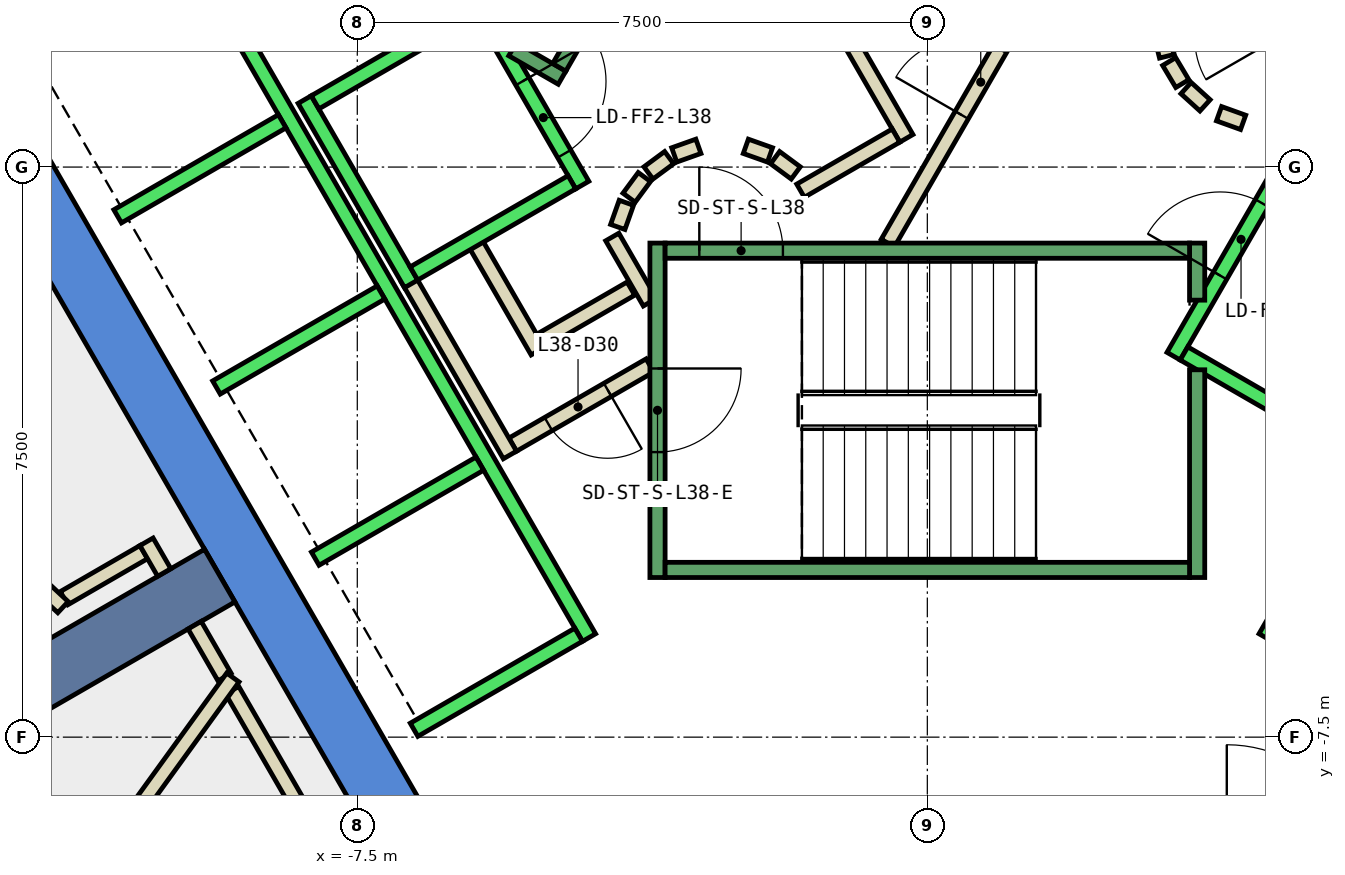
"""IFC4 building model, lengths in metres.
Left out: names, types, materials, properties, quantities, classifications, styles, units other than length and angle.
Written with IfcOpenShell. Run it as: python <this file> out.ifc"""

import sys

from ifc_helpers import new_model, si_unit, direction, frame, frame_2d, origin, place, context, subcontext, project, spatial, polyline, rectangle, outline, extrude, element, fill, save


model = new_model("IFC4")
c1 = context("Model", 3, precision=1e-05, world=origin(), true_north=direction((0.0, 1.0)))
c2 = subcontext(c1, "Body", "Model", "MODEL_VIEW")
j1 = project(units=[si_unit("LENGTHUNIT", "METRE"), si_unit("PLANEANGLEUNIT", "RADIAN")], contexts=[c1])
p1 = place(None, origin())
s1 = spatial("IfcSite", under=j1, at=p1, CompositionType="ELEMENT")
p2 = place(p1, origin())
s2 = spatial("IfcBuilding", under=s1, at=p2, CompositionType="ELEMENT")
p3 = place(p2, frame((0.0, 0.0, 171.8)))
s3 = spatial("IfcBuildingStorey", under=s2, at=p3, CompositionType="ELEMENT", Elevation=171.8)
p4 = place(p3, frame((0.0, 0.0, -0.4)))
e1 = element("IfcWall", 1, at=p4, inside=s3, PredefinedType="SHEAR", context=c2, shape_type="SweptSolid", body=[
    extrude(outline(polyline([(-13.856, 2.5), (-6.928, -9.5), (-6.466, -8.7), (-12.933, 2.5), (-13.856, 2.5)])), origin(), (0.0, 0.0, 1.0), 4.2),
])
p5 = place(p3, frame((-9.31, -5.375, -0.4), z_axis=(0.0, 0.0, 1.0), x_axis=(-0.866017533419, -0.500013631625, 0.0)))
e2 = element("IfcWall", 2, at=p5, inside=s3, PredefinedType="SHEAR", context=c2, shape_type="SweptSolid", body=[
    extrude(rectangle(XDim=9.0, YDim=0.8, at=frame_2d((4.5, 0.0))), origin(), (0.0, 0.0, 1.0), 4.2),
])
p6 = place(p3, frame((-3.9, -1.599, 0.0), z_axis=(0.0, 0.0, 1.0), x_axis=(-0.865969445389, -0.500096910261, 0.0)))
e3 = element("IfcWall", 3, at=p6, inside=s3, PredefinedType="PARTITIONING", context=c2, shape_type="SweptSolid", body=[
    extrude(rectangle(XDim=1.373, YDim=0.2, at=frame_2d((0.687, 0.0))), origin(), (0.0, 0.0, 1.0), 3.8),
])
p7 = place(p3, frame((-5.126, -2.422, 0.0), z_axis=(0.0, 0.0, 1.0), x_axis=(-0.500062241894, 0.865989465428, 0.0)))
e4 = element("IfcWall", 4, at=p7, inside=s3, PredefinedType="PARTITIONING", context=c2, shape_type="SweptSolid", body=[
    extrude(rectangle(XDim=1.7, YDim=0.2, at=frame_2d((0.85, 0.0))), origin(), (0.0, 0.0, 1.0), 3.8),
])
p8 = place(p3, frame((-3.65, -2.61, 0.0), z_axis=(0.0, 0.0, 1.0), x_axis=(-0.866072462134, -0.499918483688, 0.0)))
e5 = element("IfcWall", 5, at=p8, inside=s3, PredefinedType="PARTITIONING", context=c2, shape_type="SweptSolid", body=[
    extrude(rectangle(XDim=2.084, YDim=0.2, at=frame_2d((1.042, 0.0))), origin(), (0.0, 0.0, 1.0), 3.8),
])
p9 = place(p8, frame((0.642, 0.0, 0.0)))
e6 = element("IfcOpeningElement", 6, at=p9, cuts=e5, PredefinedType="OPENING", context=c2, shape_type="SweptSolid", body=[
    extrude(rectangle(XDim=0.9, YDim=2.1, at=frame_2d((0.45, 1.05))), frame((0.0, 0.11, 0.0), z_axis=(0.0, -1.0, 0.0), x_axis=(1.0, 0.0, 0.0)), (0.0, 0.0, 1.0), 0.22),
])
p10 = place(p3, frame((-5.492, -3.788, 0.0), z_axis=(0.0, 0.0, 1.0), x_axis=(-0.500008949224, 0.866020236886, 0.0)))
e7 = element("IfcWall", 7, at=p10, inside=s3, PredefinedType="PARTITIONING", context=c2, shape_type="SweptSolid", body=[
    extrude(rectangle(XDim=2.68, YDim=0.2, at=frame_2d((1.34, 0.0))), origin(), (0.0, 0.0, 1.0), 3.8),
])
p11 = place(p3, frame((-4.145, -0.92, 0.0), z_axis=(0.0, 0.0, 1.0), x_axis=(0.499743786207, -0.866173278362, 0.0)))
e8 = element("IfcWall", 8, at=p11, inside=s3, PredefinedType="PARTITIONING", context=c2, shape_type="SweptSolid", body=[
    extrude(rectangle(XDim=0.991, YDim=0.2, at=frame_2d((0.495, 0.0))), origin(), (0.0, 0.0, 1.0), 3.8),
])
p12 = place(p3, frame((-0.52, -1.0, 0.0), z_axis=(0.0, 0.0, 1.0), x_axis=(0.50011622646, 0.865958290007, 0.0)))
e9 = element("IfcWall", 9, at=p12, inside=s3, PredefinedType="PARTITIONING", context=c2, shape_type="SweptSolid", body=[
    extrude(rectangle(XDim=4.991, YDim=0.2, at=frame_2d((2.496, 0.0))), origin(), (0.0, 0.0, 1.0), 3.8),
])
p13 = place(p12, frame((1.945, 0.0, 0.0)))
e10 = element("IfcOpeningElement", 10, at=p13, cuts=e9, PredefinedType="OPENING", context=c2, shape_type="SweptSolid", body=[
    extrude(rectangle(XDim=1.0, YDim=2.1, at=frame_2d((0.5, 1.05))), frame((0.0, 0.11, 0.0), z_axis=(0.0, -1.0, 0.0), x_axis=(1.0, 0.0, 0.0)), (0.0, 0.0, 1.0), 0.22),
])
p14 = place(p3, frame((3.07, 1.786, 0.0), z_axis=(0.0, 0.0, 1.0), x_axis=(0.242705583207, -0.970099994784, 0.0)))
e11 = element("IfcWall", 11, at=p14, inside=s3, PredefinedType="PARTITIONING", context=c2, shape_type="SweptSolid", body=[
    extrude(rectangle(XDim=0.338, YDim=0.2, at=frame_2d((0.169, 0.0))), origin(), (0.0, 0.0, 1.0), 3.8),
])
for number, where, z_axis, x_axis in (
    (12, (3.182, 1.388, 0.0), (0.0, 0.0, 1.0), (0.512, -0.859, 0.0)),
    (13, (3.404, 1.039, 0.0), (0.0, 0.0, 1.0), (0.74, -0.672, 0.0)),
):
    element("IfcWall", number, at=place(p3, frame(where, z_axis=z_axis, x_axis=x_axis)), inside=s3, PredefinedType="PARTITIONING", context=c2, shape_type="SweptSolid", body=[
        extrude(rectangle(XDim=0.338, YDim=0.2, at=frame_2d((0.169, 0.0))), origin(), (0.0, 0.0, 1.0), 3.8),
    ])
p15 = place(p3, frame((3.838, 0.702, 0.0), z_axis=(0.0, 0.0, 1.0), x_axis=(0.941035081519, -0.338308993895, 0.0)))
e14 = element("IfcWall", 14, at=p15, inside=s3, PredefinedType="PARTITIONING", context=c2, shape_type="SweptSolid", body=[
    extrude(rectangle(XDim=0.337, YDim=0.2, at=frame_2d((0.168, 0.0))), origin(), (0.0, 0.0, 1.0), 3.8),
])
p16 = place(p3, frame((-2.771, 4.7, 0.0), z_axis=(0.0, 0.0, 1.0), x_axis=(0.499969479948, -0.866043023828, 0.0)))
e15 = element("IfcWall", 15, at=p16, inside=s3, PredefinedType="PARTITIONING", context=c2, shape_type="SweptSolid", body=[
    extrude(rectangle(XDim=4.99, YDim=0.2, at=frame_2d((2.495, 0.0))), origin(), (0.0, 0.0, 1.0), 3.8),
])
p17 = place(p16, frame((1.945, 0.0, 0.0)))
e16 = element("IfcOpeningElement", 16, at=p17, cuts=e15, PredefinedType="OPENING", context=c2, shape_type="SweptSolid", body=[
    extrude(rectangle(XDim=1.0, YDim=2.1, at=frame_2d((0.5, 1.05))), frame((0.0, 0.11, 0.0), z_axis=(0.0, -1.0, 0.0), x_axis=(1.0, 0.0, 0.0)), (0.0, 0.0, 1.0), 0.22),
])
p18 = place(p3, frame((-0.412, 0.414, 0.0), z_axis=(0.0, 0.0, 1.0), x_axis=(-0.866017369001, -0.500013916395, 0.0)))
e17 = element("IfcWall", 17, at=p18, inside=s3, PredefinedType="PARTITIONING", context=c2, shape_type="SweptSolid", body=[
    extrude(rectangle(XDim=1.45, YDim=0.2, at=frame_2d((0.725, 0.0))), origin(), (0.0, 0.0, 1.0), 3.8),
])
p19 = place(p3, frame((-1.731, -0.077, 0.0), z_axis=(0.0, 0.0, 1.0), x_axis=(-0.804311165252, 0.594208338422, 0.0)))
e18 = element("IfcWall", 18, at=p19, inside=s3, PredefinedType="PARTITIONING", context=c2, shape_type="SweptSolid", body=[
    extrude(rectangle(XDim=0.338, YDim=0.2, at=frame_2d((0.169, 0.0))), origin(), (0.0, 0.0, 1.0), 3.8),
])
p20 = place(p3, frame((-2.07, 0.16, 0.0), z_axis=(0.0, 0.0, 1.0), x_axis=(-0.942199461132, 0.335052496547, 0.0)))
e19 = element("IfcWall", 19, at=p20, inside=s3, PredefinedType="PARTITIONING", context=c2, shape_type="SweptSolid", body=[
    extrude(rectangle(XDim=0.337, YDim=0.2, at=frame_2d((0.169, 0.0))), origin(), (0.0, 0.0, 1.0), 3.8),
])
p21 = place(p3, frame((-3.012, 0.273, 0.0), z_axis=(0.0, 0.0, 1.0), x_axis=(-0.942280615813, -0.334824194261, 0.0)))
e20 = element("IfcWall", 20, at=p21, inside=s3, PredefinedType="PARTITIONING", context=c2, shape_type="SweptSolid", body=[
    extrude(rectangle(XDim=0.338, YDim=0.2, at=frame_2d((0.169, 0.0))), origin(), (0.0, 0.0, 1.0), 3.8),
])
p22 = place(p3, frame((-3.397, 0.124, 0.0), z_axis=(0.0, 0.0, 1.0), x_axis=(-0.804311165252, -0.594208338422, 0.0)))
e21 = element("IfcWall", 21, at=p22, inside=s3, PredefinedType="PARTITIONING", context=c2, shape_type="SweptSolid", body=[
    extrude(rectangle(XDim=0.338, YDim=0.2, at=frame_2d((0.169, 0.0))), origin(), (0.0, 0.0, 1.0), 3.8),
])
p23 = place(p3, frame((-3.723, -0.131, 0.0), z_axis=(0.0, 0.0, 1.0), x_axis=(-0.594675113454, -0.803966112121, 0.0)))
e22 = element("IfcWall", 22, at=p23, inside=s3, PredefinedType="PARTITIONING", context=c2, shape_type="SweptSolid", body=[
    extrude(rectangle(XDim=0.338, YDim=0.2, at=frame_2d((0.169, 0.0))), origin(), (0.0, 0.0, 1.0), 3.8),
])
p24 = place(p3, frame((-3.96, -0.47, 0.0), z_axis=(0.0, 0.0, 1.0), x_axis=(-0.334824194261, -0.942280615813, 0.0)))
e23 = element("IfcWall", 23, at=p24, inside=s3, PredefinedType="PARTITIONING", context=c2, shape_type="SweptSolid", body=[
    extrude(rectangle(XDim=0.338, YDim=0.2, at=frame_2d((0.169, 0.0))), origin(), (0.0, 0.0, 1.0), 3.8),
])
p25 = place(p3, frame((-7.862, -9.107, 0.0), z_axis=(0.0, 0.0, 1.0), x_axis=(-0.499994038704, 0.866028845513, 0.0)))
e24 = element("IfcWall", 24, at=p25, inside=s3, PredefinedType="PARTITIONING", context=c2, shape_type="SweptSolid", body=[
    extrude(rectangle(XDim=2.568, YDim=0.2, at=frame_2d((1.284, 0.0))), origin(), (0.0, 0.0, 1.0), 3.8),
])
p26 = place(p3, frame((-9.246, -6.71, 0.0), z_axis=(0.0, 0.0, 1.0), x_axis=(-0.499570510076, 0.86627322795, 0.0)))
e25 = element("IfcWall", 25, at=p26, inside=s3, PredefinedType="PARTITIONING", context=c2, shape_type="SweptSolid", body=[
    extrude(rectangle(XDim=0.788, YDim=0.2, at=frame_2d((0.394, 0.0))), origin(), (0.0, 0.0, 1.0), 3.8),
])
p27 = place(p3, frame((-10.31, -5.066, 0.0), z_axis=(0.0, 0.0, 1.0), x_axis=(-0.865587329375, -0.500758000661, 0.0)))
e26 = element("IfcWall", 26, at=p27, inside=s3, PredefinedType="PARTITIONING", context=c2, shape_type="SweptSolid", body=[
    extrude(rectangle(XDim=1.21, YDim=0.2, at=frame_2d((0.605, 0.0))), origin(), (0.0, 0.0, 1.0), 3.8),
])
p28 = place(p3, frame((-11.372, -5.79, 0.0), z_axis=(0.0, 0.0, 1.0), x_axis=(-0.730922728623, 0.682460229451, 0.0)))
e27 = element("IfcWall", 27, at=p28, inside=s3, PredefinedType="PARTITIONING", context=c2, shape_type="SweptSolid", body=[
    extrude(rectangle(XDim=9.924, YDim=0.2, at=frame_2d((4.962, 0.0))), origin(), (0.0, 0.0, 1.0), 3.8),
])
p29 = place(p3, frame((-13.744, -13.076, 0.0), z_axis=(0.0, 0.0, 1.0), x_axis=(0.586577314901, 0.809893235953, 0.0)))
e28 = element("IfcWall", 28, at=p29, inside=s3, PredefinedType="PARTITIONING", context=c2, shape_type="SweptSolid", body=[
    extrude(rectangle(XDim=7.854, YDim=0.2, at=frame_2d((3.927, 0.0))), origin(), (0.0, 0.0, 1.0), 3.8),
])
p30 = place(p3, frame((-10.04, -5.334, 0.0), z_axis=(0.0, 0.0, 1.0), x_axis=(-0.499405191234, 0.86636854454, 0.0)))
e29 = element("IfcWall", 29, at=p30, inside=s3, PredefinedType="PARTITIONING", context=c2, shape_type="SweptSolid", body=[
    extrude(rectangle(XDim=0.466, YDim=0.2, at=frame_2d((0.233, 0.0))), origin(), (0.0, 0.0, 1.0), 3.8),
])
p31 = place(p3, frame((-5.94, 2.188, 0.0), z_axis=(0.0, 0.0, 1.0), x_axis=(0.49994636267, -0.866056369097, 0.0)))
e30 = element("IfcWall", 30, at=p31, inside=s3, PredefinedType="STANDARD", context=c2, shape_type="SweptSolid", body=[
    extrude(rectangle(XDim=2.8, YDim=0.2, at=frame_2d((1.4, 0.0))), origin(), (0.0, 0.0, 1.0), 3.8),
])
p32 = place(p31, frame((1.225, 0.0, 0.0)))
e31 = element("IfcOpeningElement", 31, at=p32, cuts=e30, PredefinedType="OPENING", context=c2, shape_type="SweptSolid", body=[
    extrude(rectangle(XDim=1.1, YDim=2.1, at=frame_2d((0.55, 1.05))), frame((0.0, 0.11, 0.0), z_axis=(0.0, -1.0, 0.0), x_axis=(1.0, 0.0, 0.0)), (0.0, 0.0, 1.0), 0.22),
])
p33 = place(p3, frame((-8.192, 0.888, 0.0), z_axis=(0.0, 0.0, 1.0), x_axis=(0.49994636267, -0.866056369097, 0.0)))
e32 = element("IfcWall", 32, at=p33, inside=s3, PredefinedType="STANDARD", context=c2, shape_type="SweptSolid", body=[
    extrude(rectangle(XDim=2.8, YDim=0.2, at=frame_2d((1.4, 0.0))), origin(), (0.0, 0.0, 1.0), 3.8),
])
for number, where, z_axis, x_axis in (
    (33, (-5.977, 2.052, 0.0), (0.0, 0.0, 1.0), (-0.866, -0.5, 0.0)),
    (34, (-4.677, -0.2, 0.0), (0.0, 0.0, 1.0), (-0.866, -0.5, 0.0)),
):
    element("IfcWall", number, at=place(p3, frame(where, z_axis=z_axis, x_axis=x_axis)), inside=s3, PredefinedType="STANDARD", context=c2, shape_type="SweptSolid", body=[
        extrude(rectangle(XDim=2.399, YDim=0.2, at=frame_2d((1.2, 0.0))), origin(), (0.0, 0.0, 1.0), 3.8),
    ])
p34 = place(p3, frame((-9.751, 2.99, 0.0), z_axis=(0.0, 0.0, 1.0), x_axis=(0.50000090737, -0.866024879913, 0.0)))
e35 = element("IfcWall", 35, at=p34, inside=s3, PredefinedType="STANDARD", context=c2, shape_type="SweptSolid", body=[
    extrude(rectangle(XDim=10.6, YDim=0.2, at=frame_2d((5.3, 0.0))), origin(), (0.0, 0.0, 1.0), 3.8),
])
for number, where, z_axis, x_axis in (
    (36, (-8.488, 0.602, 0.0), (0.0, 0.0, 1.0), (-0.866, -0.5, 0.0)),
    (37, (-7.188, -1.65, 0.0), (0.0, 0.0, 1.0), (-0.866, -0.5, 0.0)),
    (38, (-5.888, -3.902, 0.0), (0.0, 0.0, 1.0), (-0.866, -0.5, 0.0)),
    (39, (-4.588, -6.153, 0.0), (0.0, 0.0, 1.0), (-0.866, -0.5, 0.0)),
):
    element("IfcWall", number, at=place(p3, frame(where, z_axis=z_axis, x_axis=x_axis)), inside=s3, PredefinedType="STANDARD", context=c2, shape_type="SweptSolid", body=[
        extrude(rectangle(XDim=2.5, YDim=0.2, at=frame_2d((1.25, 0.0))), origin(), (0.0, 0.0, 1.0), 3.8),
    ])
p35 = place(p3, frame((3.24, -2.488, 0.0), z_axis=(0.0, 0.0, 1.0), x_axis=(0.49994636267, 0.866056369097, 0.0)))
e40 = element("IfcWall", 40, at=p35, inside=s3, PredefinedType="STANDARD", context=c2, shape_type="SweptSolid", body=[
    extrude(rectangle(XDim=2.8, YDim=0.2, at=frame_2d((1.4, 0.0))), origin(), (0.0, 0.0, 1.0), 3.8),
])
p36 = place(p35, frame((1.225, 0.0, 0.0)))
e41 = element("IfcOpeningElement", 41, at=p36, cuts=e40, PredefinedType="OPENING", context=c2, shape_type="SweptSolid", body=[
    extrude(rectangle(XDim=1.1, YDim=2.1, at=frame_2d((0.55, 1.05))), frame((0.0, 0.11, 0.0), z_axis=(0.0, -1.0, 0.0), x_axis=(1.0, 0.0, 0.0)), (0.0, 0.0, 1.0), 0.22),
])
p37 = place(p3, frame((3.377, -2.452, 0.0), z_axis=(0.0, 0.0, 1.0), x_axis=(0.865955154139, -0.50012165622, 0.0)))
e42 = element("IfcWall", 42, at=p37, inside=s3, PredefinedType="STANDARD", context=c2, shape_type="SweptSolid", body=[
    extrude(rectangle(XDim=2.4, YDim=0.2, at=frame_2d((1.2, 0.0))), origin(), (0.0, 0.0, 1.0), 3.8),
])
p38 = place(p3, frame((4.451, -6.19, 0.0), z_axis=(0.0, 0.0, 1.0), x_axis=(0.50000090737, 0.866024879913, 0.0)))
e43 = element("IfcWall", 43, at=p38, inside=s3, PredefinedType="STANDARD", context=c2, shape_type="SweptSolid", body=[
    extrude(rectangle(XDim=10.6, YDim=0.2, at=frame_2d((5.3, 0.0))), origin(), (0.0, 0.0, 1.0), 3.8),
])
p39 = place(p3, frame((-3.55, -1.0, 0.0), z_axis=(0.0, 0.0, 1.0), x_axis=(0.0, -1.0, 0.0)))
e44 = element("IfcWall", 44, at=p39, inside=s3, PredefinedType="STANDARD", context=c2, shape_type="SweptSolid", body=[
    extrude(rectangle(XDim=4.4, YDim=0.2, at=frame_2d((2.2, 0.0))), origin(), (0.0, 0.0, 1.0), 3.8),
])
p40 = place(p39, frame((1.65, 0.0, 0.0)))
e45 = element("IfcOpeningElement", 45, at=p40, cuts=e44, PredefinedType="OPENING", context=c2, shape_type="SweptSolid", body=[
    extrude(rectangle(XDim=1.1, YDim=2.2, at=frame_2d((0.55, 1.1))), frame((0.0, 0.11, 0.0), z_axis=(0.0, -1.0, 0.0), x_axis=(1.0, 0.0, 0.0)), (0.0, 0.0, 1.0), 0.22),
])
p41 = place(p3, frame((3.55, -2.667, 0.0), z_axis=(0.0, 0.0, 1.0), x_axis=(0.0, -1.0, 0.0)))
e46 = element("IfcWall", 46, at=p41, inside=s3, PredefinedType="STANDARD", context=c2, shape_type="SweptSolid", body=[
    extrude(rectangle(XDim=2.733, YDim=0.2, at=frame_2d((1.366, 0.0))), origin(), (0.0, 0.0, 1.0), 3.8),
])
p42 = place(p3, frame((3.55, -1.0, 0.0), z_axis=(0.0, 0.0, 1.0), x_axis=(0.0, -1.0, 0.0)))
e47 = element("IfcWall", 47, at=p42, inside=s3, PredefinedType="STANDARD", context=c2, shape_type="SweptSolid", body=[
    extrude(rectangle(XDim=0.751, YDim=0.2, at=frame_2d((0.375, 0.0))), origin(), (0.0, 0.0, 1.0), 3.8),
])
p43 = place(p3, frame((-3.45, -1.1, 0.0), z_axis=(0.0, 0.0, 1.0), x_axis=(1.0, 0.0, 0.0)))
e48 = element("IfcWall", 48, at=p43, inside=s3, PredefinedType="STANDARD", context=c2, shape_type="SweptSolid", body=[
    extrude(rectangle(XDim=6.9, YDim=0.2, at=frame_2d((3.45, 0.0))), origin(), (0.0, 0.0, 1.0), 3.8),
])
p44 = place(p43, frame((0.45, 0.0, 0.0)))
e49 = element("IfcOpeningElement", 49, at=p44, cuts=e48, PredefinedType="OPENING", context=c2, shape_type="SweptSolid", body=[
    extrude(rectangle(XDim=1.1, YDim=2.2, at=frame_2d((0.55, 1.1))), frame((0.0, 0.11, 0.0), z_axis=(0.0, -1.0, 0.0), x_axis=(1.0, 0.0, 0.0)), (0.0, 0.0, 1.0), 0.22),
])
p45 = place(p3, frame((-3.45, -5.3, 0.0), z_axis=(0.0, 0.0, 1.0), x_axis=(1.0, 0.0, 0.0)))
e50 = element("IfcWall", 50, at=p45, inside=s3, PredefinedType="STANDARD", context=c2, shape_type="SweptSolid", body=[
    extrude(rectangle(XDim=6.9, YDim=0.2, at=frame_2d((3.45, 0.0))), origin(), (0.0, 0.0, 1.0), 3.8),
])
p46 = place(p3, frame((4.843, 1.312, 0.0), z_axis=(0.0, 0.0, 1.0), x_axis=(-0.499963383562, 0.866046543262, 0.0)))
e51 = element("IfcWall", 51, at=p46, inside=s3, PredefinedType="STANDARD", context=c2, shape_type="SweptSolid", body=[
    extrude(rectangle(XDim=6.9, YDim=0.2, at=frame_2d((3.45, 0.0))), origin(), (0.0, 0.0, 1.0), 3.8),
])
p47 = place(p46, frame((0.45, 0.0, 0.0)))
e52 = element("IfcOpeningElement", 52, at=p47, cuts=e51, PredefinedType="OPENING", context=c2, shape_type="SweptSolid", body=[
    extrude(rectangle(XDim=1.1, YDim=2.2, at=frame_2d((0.55, 1.1))), frame((0.0, 0.11, 0.0), z_axis=(0.0, -1.0, 0.0), x_axis=(1.0, 0.0, 0.0)), (0.0, 0.0, 1.0), 0.22),
])
p48 = place(p3, frame((-4.806, 1.176, 0.0), z_axis=(0.0, 0.0, 1.0), x_axis=(-0.866558586415, 0.499075361355, 0.0)))
e53 = element("IfcWall", 53, at=p48, inside=s3, PredefinedType="STANDARD", context=c2, shape_type="SweptSolid", body=[
    extrude(rectangle(XDim=0.751, YDim=0.2, at=frame_2d((0.376, 0.0))), origin(), (0.0, 0.0, 1.0), 3.8),
])
p49 = place(p3, frame((-1.393, 7.288, 0.0), z_axis=(0.0, 0.0, 1.0), x_axis=(-0.499963383562, -0.866046543262, 0.0)))
e54 = element("IfcWall", 54, at=p49, inside=s3, PredefinedType="STANDARD", context=c2, shape_type="SweptSolid", body=[
    extrude(rectangle(XDim=6.9, YDim=0.2, at=frame_2d((3.45, 0.0))), origin(), (0.0, 0.0, 1.0), 3.8),
])
p50 = place(p49, frame((0.45, 0.0, 0.0)))
e55 = element("IfcOpeningElement", 55, at=p50, cuts=e54, PredefinedType="OPENING", context=c2, shape_type="SweptSolid", body=[
    extrude(rectangle(XDim=1.1, YDim=2.2, at=frame_2d((0.55, 1.1))), frame((0.0, 0.11, 0.0), z_axis=(0.0, -1.0, 0.0), x_axis=(1.0, 0.0, 0.0)), (0.0, 0.0, 1.0), 0.22),
])
p51 = place(p13, origin())
e56 = element("IfcDoor", 56, at=p51, inside=s3, OperationType="SINGLE_SWING_LEFT", PredefinedType="DOOR", context=c2, shape_type="SweptSolid", body=[
    extrude(rectangle(XDim=1.0, YDim=2.1, at=frame_2d((0.5, 1.05))), frame((0.0, 0.025, 0.0), z_axis=(0.0, -1.0, 0.0), x_axis=(1.0, 0.0, 0.0)), (0.0, 0.0, 1.0), 0.05),
])
fill(e10, e56)
p52 = place(p9, origin())
e57 = element("IfcDoor", 57, at=p52, inside=s3, OperationType="SINGLE_SWING_LEFT", PredefinedType="DOOR", context=c2, shape_type="SweptSolid", body=[
    extrude(rectangle(XDim=0.9, YDim=2.1, at=frame_2d((0.45, 1.05))), frame((0.0, 0.025, 0.0), z_axis=(0.0, -1.0, 0.0), x_axis=(1.0, 0.0, 0.0)), (0.0, 0.0, 1.0), 0.05),
])
fill(e6, e57)
p53 = place(p36, origin())
e58 = element("IfcDoor", 58, at=p53, inside=s3, OperationType="SLIDING_TO_LEFT", PredefinedType="DOOR", context=c2, shape_type="SweptSolid", body=[
    extrude(rectangle(XDim=1.1, YDim=2.1, at=frame_2d((0.55, 1.05))), frame((0.0, 0.025, 0.0), z_axis=(0.0, -1.0, 0.0), x_axis=(1.0, 0.0, 0.0)), (0.0, 0.0, 1.0), 0.05),
])
fill(e41, e58)
p54 = place(p32, origin())
e59 = element("IfcDoor", 59, at=p54, inside=s3, OperationType="SLIDING_TO_LEFT", PredefinedType="DOOR", context=c2, shape_type="SweptSolid", body=[
    extrude(rectangle(XDim=1.1, YDim=2.1, at=frame_2d((0.55, 1.05))), frame((0.0, 0.025, 0.0), z_axis=(0.0, -1.0, 0.0), x_axis=(1.0, 0.0, 0.0)), (0.0, 0.0, 1.0), 0.05),
])
fill(e31, e59)
p55 = place(p44, origin())
e60 = element("IfcDoor", 60, at=p55, inside=s3, OperationType="SINGLE_SWING_LEFT", PredefinedType="DOOR", context=c2, shape_type="SweptSolid", body=[
    extrude(rectangle(XDim=1.1, YDim=2.2, at=frame_2d((0.55, 1.1))), frame((0.0, 0.025, 0.0), z_axis=(0.0, -1.0, 0.0), x_axis=(1.0, 0.0, 0.0)), (0.0, 0.0, 1.0), 0.05),
])
fill(e49, e60)
p56 = place(p40, origin())
e61 = element("IfcDoor", 61, at=p56, inside=s3, OperationType="SINGLE_SWING_LEFT", PredefinedType="DOOR", context=c2, shape_type="SweptSolid", body=[
    extrude(rectangle(XDim=1.1, YDim=2.2, at=frame_2d((0.55, 1.1))), frame((0.0, 0.025, 0.0), z_axis=(0.0, -1.0, 0.0), x_axis=(1.0, 0.0, 0.0)), (0.0, 0.0, 1.0), 0.05),
])
fill(e45, e61)
save(model, sys.argv[1])
